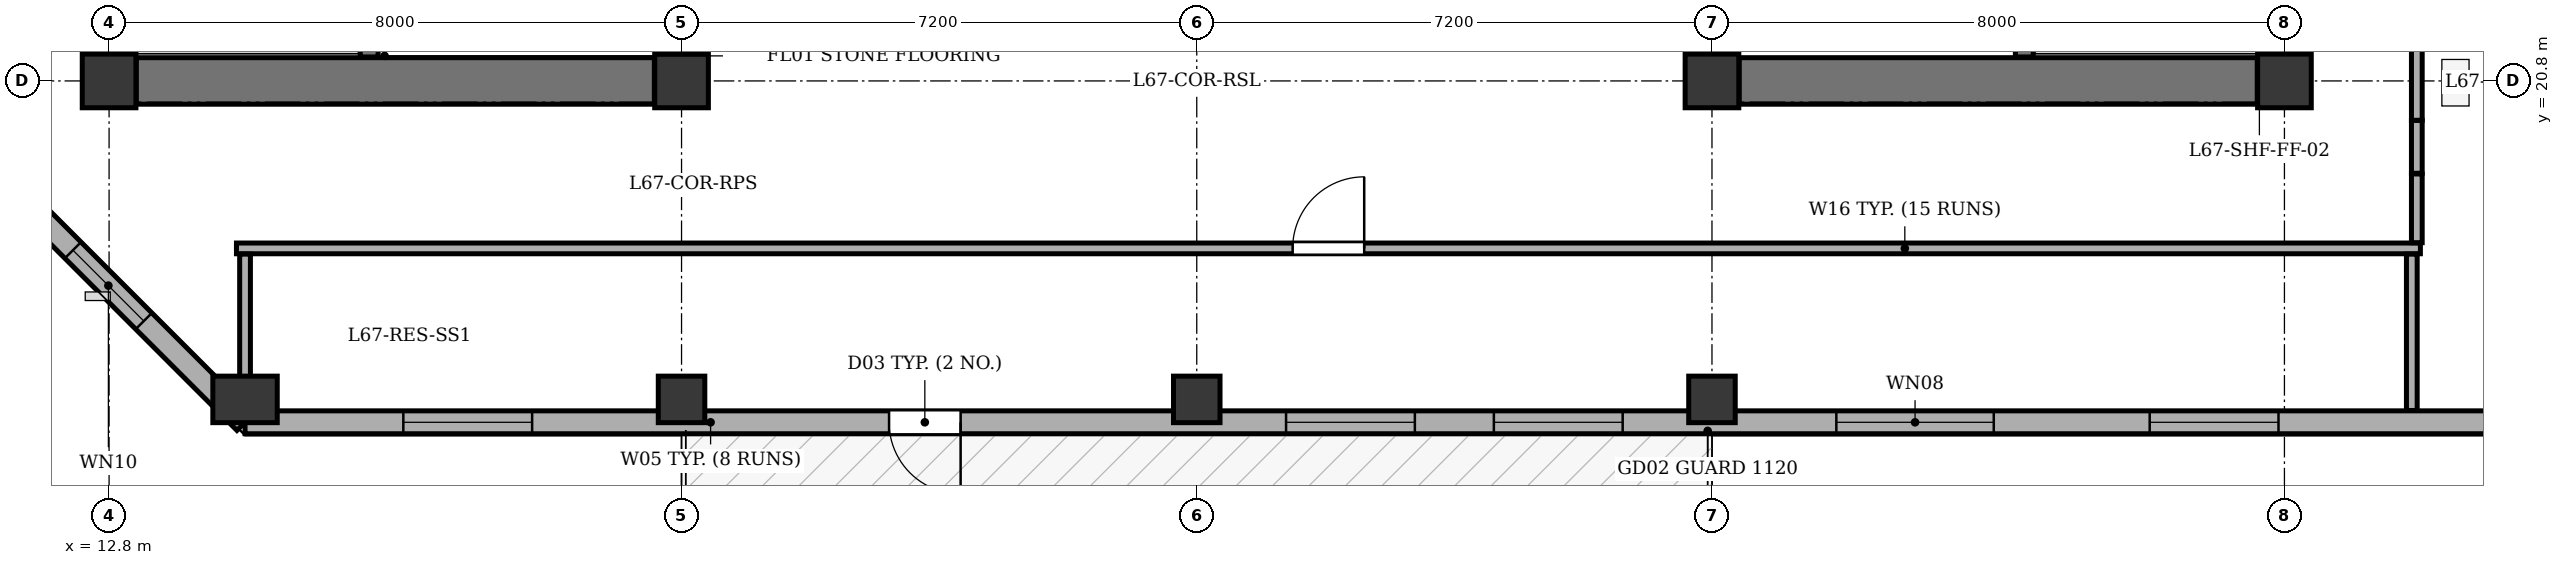
"""IFC4 building model, lengths in metres.
Left out: names, types, materials, properties, quantities, classifications, styles, units other than length and angle.
Written with IfcOpenShell. Run it as: python <this file> out.ifc"""

import sys

from ifc_helpers import new_model, si_unit, direction, frame, frame_2d, origin, origin_2d, place, context, subcontext, project, spatial, rectangle, extrude, element, fill, save


model = new_model("IFC4")
c1 = context("Model", 3, precision=1e-05, world=origin(), true_north=direction((0.0, 1.0)))
c2 = subcontext(c1, "Body", "Model", "MODEL_VIEW")
j1 = project(units=[si_unit("LENGTHUNIT", "METRE"), si_unit("PLANEANGLEUNIT", "RADIAN")], contexts=[c1])
p1 = place(None, origin())
s1 = spatial("IfcSite", under=j1, at=p1, CompositionType="ELEMENT")
p2 = place(p1, origin())
s2 = spatial("IfcBuilding", under=s1, at=p2, CompositionType="ELEMENT")
p3 = place(p2, frame((0.0, 0.0, 255.1)))
s3 = spatial("IfcBuildingStorey", under=s2, at=p3, CompositionType="ELEMENT", Elevation=255.1)
for number, where, z_axis, x_axis in (
    (1, (12.8, 20.8, 0.0), (0.0, 0.0, 1.0), (1.0, 0.0, 0.0)),
    (2, (20.8, 20.8, 0.0), (0.0, 0.0, 1.0), (1.0, 0.0, 0.0)),
    (3, (35.2, 20.8, 0.0), (0.0, 0.0, 1.0), (1.0, 0.0, 0.0)),
    (4, (43.2, 20.8, 0.0), (0.0, 0.0, 1.0), (1.0, 0.0, 0.0)),
):
    element("IfcColumn", number, at=place(p3, frame(where, z_axis=z_axis, x_axis=x_axis)), inside=s3, PredefinedType="COLUMN", context=c2, shape_type="SweptSolid", body=[
        extrude(rectangle(XDim=0.75, YDim=0.75, at=origin_2d()), origin(), (0.0, 0.0, 1.0), 3.4),
    ])
p4 = place(p3, frame((14.7, 16.35, 0.0), z_axis=(0.0, 0.0, 1.0), x_axis=(1.0, 0.0, 0.0)))
e5 = element("IfcColumn", 5, at=p4, inside=s3, PredefinedType="COLUMN", context=c2, shape_type="SweptSolid", body=[
    extrude(rectangle(XDim=0.65, YDim=0.9, at=origin_2d()), origin(), (0.0, 0.0, 1.0), 3.4),
])
for number, where, z_axis, x_axis in (
    (6, (20.8, 16.35, 0.0), (0.0, 0.0, 1.0), (1.0, 0.0, 0.0)),
    (7, (28.0, 16.35, 0.0), (0.0, 0.0, 1.0), (1.0, 0.0, 0.0)),
    (8, (35.2, 16.35, 0.0), (0.0, 0.0, 1.0), (1.0, 0.0, 0.0)),
):
    element("IfcColumn", number, at=place(p3, frame(where, z_axis=z_axis, x_axis=x_axis)), inside=s3, PredefinedType="COLUMN", context=c2, shape_type="SweptSolid", body=[
        extrude(rectangle(XDim=0.65, YDim=0.65, at=origin_2d()), origin(), (0.0, 0.0, 1.0), 3.4),
    ])
p5 = place(p3, frame((51.7, 16.03, 0.0), z_axis=(0.0, 0.0, 1.0), x_axis=(-1.0, 0.0, 0.0)))
e9 = element("IfcWall", 9, at=p5, inside=s3, PredefinedType="STANDARD", context=c2, shape_type="SweptSolid", body=[
    extrude(rectangle(XDim=37.0, YDim=0.32, at=frame_2d((18.5, 0.0))), origin(), (0.0, 0.0, 1.0), 2.725),
])
p6 = place(p5, frame((27.0, 0.0, 0.0)))
e10 = element("IfcOpeningElement", 10, at=p6, cuts=e9, PredefinedType="OPENING", context=c2, shape_type="SweptSolid", body=[
    extrude(rectangle(XDim=1.0, YDim=2.02, at=frame_2d((0.5, 1.01))), frame((0.0, 0.17, 0.0), z_axis=(0.0, -1.0, 0.0), x_axis=(1.0, 0.0, 0.0)), (0.0, 0.0, 1.0), 0.34),
])
p7 = place(p5, frame((1.235, 0.0, 0.75)))
e11 = element("IfcOpeningElement", 11, at=p7, cuts=e9, PredefinedType="OPENING", context=c2, shape_type="SweptSolid", body=[
    extrude(rectangle(XDim=1.8, YDim=1.7, at=frame_2d((0.9, 0.85))), frame((0.0, 0.17, 0.0), z_axis=(0.0, -1.0, 0.0), x_axis=(1.0, 0.0, 0.0)), (0.0, 0.0, 1.0), 0.34),
])
p8 = place(p5, frame((3.885, 0.0, 0.75)))
e12 = element("IfcOpeningElement", 12, at=p8, cuts=e9, PredefinedType="OPENING", context=c2, shape_type="SweptSolid", body=[
    extrude(rectangle(XDim=1.8, YDim=1.7, at=frame_2d((0.9, 0.85))), frame((0.0, 0.17, 0.0), z_axis=(0.0, -1.0, 0.0), x_axis=(1.0, 0.0, 0.0)), (0.0, 0.0, 1.0), 0.34),
])
p9 = place(p5, frame((8.583, 0.0, 0.75)))
e13 = element("IfcOpeningElement", 13, at=p9, cuts=e9, PredefinedType="OPENING", context=c2, shape_type="SweptSolid", body=[
    extrude(rectangle(XDim=1.8, YDim=1.7, at=frame_2d((0.9, 0.85))), frame((0.0, 0.17, 0.0), z_axis=(0.0, -1.0, 0.0), x_axis=(1.0, 0.0, 0.0)), (0.0, 0.0, 1.0), 0.34),
])
p10 = place(p5, frame((12.562, 0.0, 0.75)))
e14 = element("IfcOpeningElement", 14, at=p10, cuts=e9, PredefinedType="OPENING", context=c2, shape_type="SweptSolid", body=[
    extrude(rectangle(XDim=2.2, YDim=1.7, at=frame_2d((1.1, 0.85))), frame((0.0, 0.17, 0.0), z_axis=(0.0, -1.0, 0.0), x_axis=(1.0, 0.0, 0.0)), (0.0, 0.0, 1.0), 0.34),
])
p11 = place(p5, frame((17.748, 0.0, 0.75)))
e15 = element("IfcOpeningElement", 15, at=p11, cuts=e9, PredefinedType="OPENING", context=c2, shape_type="SweptSolid", body=[
    extrude(rectangle(XDim=1.8, YDim=1.7, at=frame_2d((0.9, 0.85))), frame((0.0, 0.17, 0.0), z_axis=(0.0, -1.0, 0.0), x_axis=(1.0, 0.0, 0.0)), (0.0, 0.0, 1.0), 0.34),
])
p12 = place(p5, frame((20.652, 0.0, 0.75)))
e16 = element("IfcOpeningElement", 16, at=p12, cuts=e9, PredefinedType="OPENING", context=c2, shape_type="SweptSolid", body=[
    extrude(rectangle(XDim=1.8, YDim=1.7, at=frame_2d((0.9, 0.85))), frame((0.0, 0.17, 0.0), z_axis=(0.0, -1.0, 0.0), x_axis=(1.0, 0.0, 0.0)), (0.0, 0.0, 1.0), 0.34),
])
p13 = place(p5, frame((32.988, 0.0, 0.75)))
e17 = element("IfcOpeningElement", 17, at=p13, cuts=e9, PredefinedType="OPENING", context=c2, shape_type="SweptSolid", body=[
    extrude(rectangle(XDim=1.8, YDim=1.7, at=frame_2d((0.9, 0.85))), frame((0.0, 0.17, 0.0), z_axis=(0.0, -1.0, 0.0), x_axis=(1.0, 0.0, 0.0)), (0.0, 0.0, 1.0), 0.34),
])
p14 = place(p3, frame((14.7, 16.03, 0.0), z_axis=(0.0, 0.0, 1.0), x_axis=(-0.707106781187, 0.707106781187, 0.0)))
e18 = element("IfcWall", 18, at=p14, inside=s3, PredefinedType="STANDARD", context=c2, shape_type="SweptSolid", body=[
    extrude(rectangle(XDim=5.402, YDim=0.32, at=frame_2d((2.701, 0.0))), origin(), (0.0, 0.0, 1.0), 2.725),
])
p15 = place(p14, frame((2.001, 0.0, 0.75)))
e19 = element("IfcOpeningElement", 19, at=p15, cuts=e18, PredefinedType="OPENING", context=c2, shape_type="SweptSolid", body=[
    extrude(rectangle(XDim=1.4, YDim=1.65, at=frame_2d((0.7, 0.825))), frame((0.0, 0.17, 0.0), z_axis=(0.0, -1.0, 0.0), x_axis=(1.0, 0.0, 0.0)), (0.0, 0.0, 1.0), 0.34),
])
p16 = place(p3, frame((12.8, 21.18, 0.0), z_axis=(0.0, 0.0, 1.0), x_axis=(0.0, 1.0, 0.0)))
e20 = element("IfcWall", 20, at=p16, inside=s3, PredefinedType="SHEAR", context=c2, shape_type="SweptSolid", body=[
    extrude(rectangle(XDim=12.04, YDim=0.65, at=frame_2d((6.02, 0.0))), origin(), (0.0, 0.0, 1.0), 3.1),
])
p17 = place(p3, frame((13.18, 20.8, 0.0), z_axis=(0.0, 0.0, 1.0), x_axis=(1.0, 0.0, 0.0)))
e21 = element("IfcWall", 21, at=p17, inside=s3, PredefinedType="SHEAR", context=c2, shape_type="SweptSolid", body=[
    extrude(rectangle(XDim=7.24, YDim=0.65, at=frame_2d((3.62, 0.0))), origin(), (0.0, 0.0, 1.0), 3.1),
])
p18 = place(p3, frame((20.8, 21.18, 0.0), z_axis=(0.0, 0.0, 1.0), x_axis=(0.0, 1.0, 0.0)))
e22 = element("IfcWall", 22, at=p18, inside=s3, PredefinedType="SHEAR", context=c2, shape_type="SweptSolid", body=[
    extrude(rectangle(XDim=3.87, YDim=0.65, at=frame_2d((1.935, 0.0))), origin(), (0.0, 0.0, 1.0), 3.1),
])
p19 = place(p18, frame((1.42, 0.0, 0.0)))
e23 = element("IfcOpeningElement", 23, at=p19, cuts=e22, PredefinedType="OPENING", context=c2, shape_type="SweptSolid", body=[
    extrude(rectangle(XDim=1.2, YDim=2.15, at=frame_2d((0.6, 1.075))), frame((0.0, 0.335, 0.0), z_axis=(0.0, -1.0, 0.0), x_axis=(1.0, 0.0, 0.0)), (0.0, 0.0, 1.0), 0.67),
])
p20 = place(p3, frame((16.435, 21.135, 0.0), z_axis=(0.0, 0.0, 1.0), x_axis=(0.0, 1.0, 0.0)))
e24 = element("IfcWall", 24, at=p20, inside=s3, PredefinedType="SHEAR", context=c2, shape_type="SweptSolid", body=[
    extrude(rectangle(XDim=12.13, YDim=0.25, at=frame_2d((6.065, 0.0))), origin(), (0.0, 0.0, 1.0), 3.1),
])
p21 = place(p20, frame((0.515, 0.0, 0.0)))
e25 = element("IfcOpeningElement", 25, at=p21, cuts=e24, PredefinedType="OPENING", context=c2, shape_type="SweptSolid", body=[
    extrude(rectangle(XDim=1.2, YDim=2.15, at=frame_2d((0.6, 1.075))), frame((0.0, 0.135, 0.0), z_axis=(0.0, -1.0, 0.0), x_axis=(1.0, 0.0, 0.0)), (0.0, 0.0, 1.0), 0.27),
])
p22 = place(p20, frame((2.665, 0.0, 0.0)))
e26 = element("IfcOpeningElement", 26, at=p22, cuts=e24, PredefinedType="OPENING", context=c2, shape_type="SweptSolid", body=[
    extrude(rectangle(XDim=1.15, YDim=2.15, at=frame_2d((0.575, 1.075))), frame((0.0, 0.135, 0.0), z_axis=(0.0, -1.0, 0.0), x_axis=(1.0, 0.0, 0.0)), (0.0, 0.0, 1.0), 0.27),
])
p23 = place(p3, frame((43.2, 21.18, 0.0), z_axis=(0.0, 0.0, 1.0), x_axis=(0.0, 1.0, 0.0)))
e27 = element("IfcWall", 27, at=p23, inside=s3, PredefinedType="SHEAR", context=c2, shape_type="SweptSolid", body=[
    extrude(rectangle(XDim=12.04, YDim=0.65, at=frame_2d((6.02, 0.0))), origin(), (0.0, 0.0, 1.0), 3.1),
])
p24 = place(p3, frame((35.58, 20.8, 0.0), z_axis=(0.0, 0.0, 1.0), x_axis=(1.0, 0.0, 0.0)))
e28 = element("IfcWall", 28, at=p24, inside=s3, PredefinedType="SHEAR", context=c2, shape_type="SweptSolid", body=[
    extrude(rectangle(XDim=7.24, YDim=0.65, at=frame_2d((3.62, 0.0))), origin(), (0.0, 0.0, 1.0), 3.1),
])
p25 = place(p3, frame((35.2, 21.18, 0.0), z_axis=(0.0, 0.0, 1.0), x_axis=(0.0, 1.0, 0.0)))
e29 = element("IfcWall", 29, at=p25, inside=s3, PredefinedType="SHEAR", context=c2, shape_type="SweptSolid", body=[
    extrude(rectangle(XDim=3.87, YDim=0.65, at=frame_2d((1.935, 0.0))), origin(), (0.0, 0.0, 1.0), 3.1),
])
p26 = place(p25, frame((1.42, 0.0, 0.0)))
e30 = element("IfcOpeningElement", 30, at=p26, cuts=e29, PredefinedType="OPENING", context=c2, shape_type="SweptSolid", body=[
    extrude(rectangle(XDim=1.2, YDim=2.15, at=frame_2d((0.6, 1.075))), frame((0.0, 0.335, 0.0), z_axis=(0.0, -1.0, 0.0), x_axis=(1.0, 0.0, 0.0)), (0.0, 0.0, 1.0), 0.67),
])
p27 = place(p3, frame((39.565, 21.135, 0.0), z_axis=(0.0, 0.0, 1.0), x_axis=(0.0, 1.0, 0.0)))
e31 = element("IfcWall", 31, at=p27, inside=s3, PredefinedType="SHEAR", context=c2, shape_type="SweptSolid", body=[
    extrude(rectangle(XDim=12.13, YDim=0.25, at=frame_2d((6.065, 0.0))), origin(), (0.0, 0.0, 1.0), 3.1),
])
p28 = place(p27, frame((0.515, 0.0, 0.0)))
e32 = element("IfcOpeningElement", 32, at=p28, cuts=e31, PredefinedType="OPENING", context=c2, shape_type="SweptSolid", body=[
    extrude(rectangle(XDim=1.2, YDim=2.15, at=frame_2d((0.6, 1.075))), frame((0.0, 0.135, 0.0), z_axis=(0.0, -1.0, 0.0), x_axis=(1.0, 0.0, 0.0)), (0.0, 0.0, 1.0), 0.27),
])
p29 = place(p27, frame((2.665, 0.0, 0.0)))
e33 = element("IfcOpeningElement", 33, at=p29, cuts=e31, PredefinedType="OPENING", context=c2, shape_type="SweptSolid", body=[
    extrude(rectangle(XDim=1.15, YDim=2.15, at=frame_2d((0.575, 1.075))), frame((0.0, 0.135, 0.0), z_axis=(0.0, -1.0, 0.0), x_axis=(1.0, 0.0, 0.0)), (0.0, 0.0, 1.0), 0.27),
])
p30 = place(p3, frame((14.58, 18.46, 0.0), z_axis=(0.0, 0.0, 1.0), x_axis=(1.0, 0.0, 0.0)))
e34 = element("IfcWall", 34, at=p30, inside=s3, PredefinedType="PARTITIONING", context=c2, shape_type="SweptSolid", body=[
    extrude(rectangle(XDim=30.52, YDim=0.15, at=frame_2d((15.26, 0.0))), origin(), (0.0, 0.0, 1.0), 3.1),
])
p31 = place(p30, frame((14.76, 0.0, 0.0)))
e35 = element("IfcOpeningElement", 35, at=p31, cuts=e34, PredefinedType="OPENING", context=c2, shape_type="SweptSolid", body=[
    extrude(rectangle(XDim=1.0, YDim=2.1, at=frame_2d((0.5, 1.05))), frame((0.0, 0.085, 0.0), z_axis=(0.0, -1.0, 0.0), x_axis=(1.0, 0.0, 0.0)), (0.0, 0.0, 1.0), 0.17),
])
p32 = place(p3, frame((14.7, 16.195, 0.0), z_axis=(0.0, 0.0, 1.0), x_axis=(0.0, 1.0, 0.0)))
e36 = element("IfcWall", 36, at=p32, inside=s3, PredefinedType="PARTITIONING", context=c2, shape_type="SweptSolid", body=[
    extrude(rectangle(XDim=2.185, YDim=0.15, at=frame_2d((1.092, 0.0))), origin(), (0.0, 0.0, 1.0), 3.1),
])
p33 = place(p3, frame((44.98, 16.195, 0.0), z_axis=(0.0, 0.0, 1.0), x_axis=(0.0, 1.0, 0.0)))
e37 = element("IfcWall", 37, at=p33, inside=s3, PredefinedType="PARTITIONING", context=c2, shape_type="SweptSolid", body=[
    extrude(rectangle(XDim=2.185, YDim=0.15, at=frame_2d((1.092, 0.0))), origin(), (0.0, 0.0, 1.0), 2.725),
])
p34 = place(p3, frame((45.05, 19.5, 0.0), z_axis=(0.0, 0.0, 1.0), x_axis=(0.0, -1.0, 0.0)))
e38 = element("IfcWall", 38, at=p34, inside=s3, PredefinedType="PARTITIONING", context=c2, shape_type="SweptSolid", body=[
    extrude(rectangle(XDim=0.96, YDim=0.15, at=frame_2d((0.48, 0.0))), origin(), (0.0, 0.0, 1.0), 2.725),
])
p35 = place(p3, frame((45.05, 19.51, 0.0), z_axis=(0.0, 0.0, 1.0), x_axis=(0.0, 1.0, 0.0)))
e39 = element("IfcWall", 39, at=p35, inside=s3, PredefinedType="PARTITIONING", context=c2, shape_type="SweptSolid", body=[
    extrude(rectangle(XDim=0.74, YDim=0.15, at=frame_2d((0.37, 0.0))), origin(), (0.0, 0.0, 1.0), 2.725),
])
p36 = place(p3, frame((45.05, 20.25, 0.0), z_axis=(0.0, 0.0, 1.0), x_axis=(0.0, 1.0, 0.0)))
e40 = element("IfcWall", 40, at=p36, inside=s3, PredefinedType="PARTITIONING", context=c2, shape_type="SweptSolid", body=[
    extrude(rectangle(XDim=13.9, YDim=0.15, at=frame_2d((6.95, 0.0))), origin(), (0.0, 0.0, 1.0), 2.725),
])
p37 = place(p6, origin())
e41 = element("IfcDoor", 41, at=p37, inside=s3, OperationType="SINGLE_SWING_LEFT", PredefinedType="DOOR", context=c2, shape_type="SweptSolid", body=[
    extrude(rectangle(XDim=1.0, YDim=2.02, at=frame_2d((0.5, 1.01))), frame((0.0, 0.025, 0.0), z_axis=(0.0, -1.0, 0.0), x_axis=(1.0, 0.0, 0.0)), (0.0, 0.0, 1.0), 0.05),
])
fill(e10, e41)
p38 = place(p9, origin())
e42 = element("IfcWindow", 42, at=p38, inside=s3, PartitioningType="SINGLE_PANEL", PredefinedType="WINDOW", context=c2, shape_type="SweptSolid", body=[
    extrude(rectangle(XDim=1.8, YDim=1.7, at=frame_2d((0.9, 0.85))), frame((0.0, -0.01, 0.0), z_axis=(0.0, -1.0, 0.0), x_axis=(1.0, 0.0, 0.0)), (0.0, 0.0, 1.0), 0.06),
])
fill(e13, e42)
p39 = place(p10, origin())
e43 = element("IfcWindow", 43, at=p39, inside=s3, PartitioningType="SINGLE_PANEL", PredefinedType="WINDOW", context=c2, shape_type="SweptSolid", body=[
    extrude(rectangle(XDim=2.2, YDim=1.7, at=frame_2d((1.1, 0.85))), frame((0.0, -0.01, 0.0), z_axis=(0.0, -1.0, 0.0), x_axis=(1.0, 0.0, 0.0)), (0.0, 0.0, 1.0), 0.06),
])
fill(e14, e43)
p40 = place(p11, origin())
e44 = element("IfcWindow", 44, at=p40, inside=s3, PartitioningType="SINGLE_PANEL", PredefinedType="WINDOW", context=c2, shape_type="SweptSolid", body=[
    extrude(rectangle(XDim=1.8, YDim=1.7, at=frame_2d((0.9, 0.85))), frame((0.0, -0.01, 0.0), z_axis=(0.0, -1.0, 0.0), x_axis=(1.0, 0.0, 0.0)), (0.0, 0.0, 1.0), 0.06),
])
fill(e15, e44)
p41 = place(p12, origin())
e45 = element("IfcWindow", 45, at=p41, inside=s3, PartitioningType="SINGLE_PANEL", PredefinedType="WINDOW", context=c2, shape_type="SweptSolid", body=[
    extrude(rectangle(XDim=1.8, YDim=1.7, at=frame_2d((0.9, 0.85))), frame((0.0, -0.01, 0.0), z_axis=(0.0, -1.0, 0.0), x_axis=(1.0, 0.0, 0.0)), (0.0, 0.0, 1.0), 0.06),
])
fill(e16, e45)
p42 = place(p13, origin())
e46 = element("IfcWindow", 46, at=p42, inside=s3, PartitioningType="SINGLE_PANEL", PredefinedType="WINDOW", context=c2, shape_type="SweptSolid", body=[
    extrude(rectangle(XDim=1.8, YDim=1.7, at=frame_2d((0.9, 0.85))), frame((0.0, -0.01, 0.0), z_axis=(0.0, -1.0, 0.0), x_axis=(1.0, 0.0, 0.0)), (0.0, 0.0, 1.0), 0.06),
])
fill(e17, e46)
p43 = place(p15, origin())
e47 = element("IfcWindow", 47, at=p43, inside=s3, PartitioningType="SINGLE_PANEL", PredefinedType="WINDOW", context=c2, shape_type="SweptSolid", body=[
    extrude(rectangle(XDim=1.4, YDim=1.65, at=frame_2d((0.7, 0.825))), frame((0.0, -0.01, 0.0), z_axis=(0.0, -1.0, 0.0), x_axis=(1.0, 0.0, 0.0)), (0.0, 0.0, 1.0), 0.06),
])
fill(e19, e47)
p44 = place(p31, origin())
e48 = element("IfcDoor", 48, at=p44, inside=s3, OperationType="SINGLE_SWING_RIGHT", PredefinedType="DOOR", context=c2, shape_type="SweptSolid", body=[
    extrude(rectangle(XDim=1.0, YDim=2.1, at=frame_2d((0.5, 1.05))), frame((0.0, 0.025, 0.0), z_axis=(0.0, -1.0, 0.0), x_axis=(1.0, 0.0, 0.0)), (0.0, 0.0, 1.0), 0.05),
])
fill(e35, e48)
save(model, sys.argv[1])
